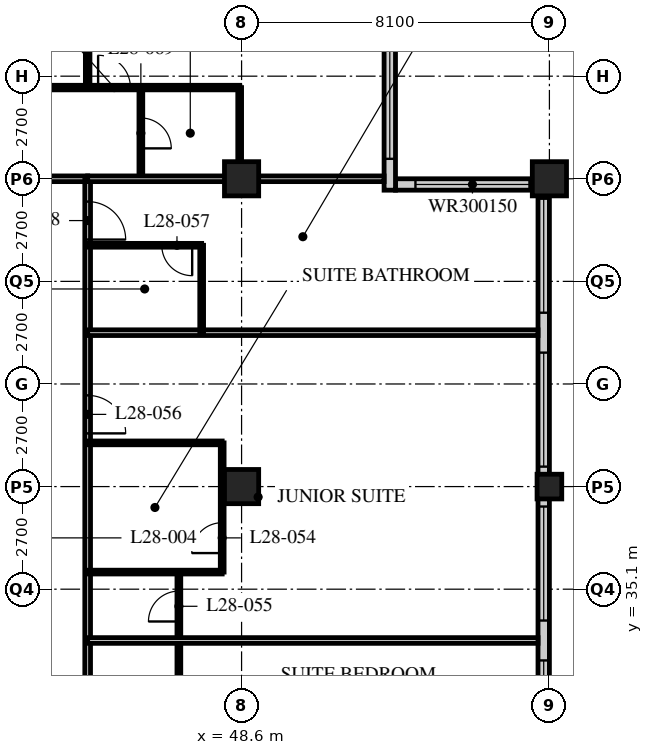
"""IFC4 building model, lengths in metres.
Left out: names, types, materials, properties, quantities, classifications, styles, units other than length and angle.
Written with IfcOpenShell. Run it as: python <this file> out.ifc"""

import sys

from ifc_helpers import new_model, si_unit, direction, frame, frame_2d, origin, origin_2d, place, context, subcontext, project, spatial, rectangle, hollow_rectangle, extrude, element, fill, save


model = new_model("IFC4")
c1 = context("Model", 3, precision=1e-05, world=origin(), true_north=direction((0.0, 1.0)))
c2 = subcontext(c1, "Body", "Model", "MODEL_VIEW")
j1 = project(units=[si_unit("LENGTHUNIT", "METRE"), si_unit("PLANEANGLEUNIT", "RADIAN")], contexts=[c1])
p1 = place(None, origin())
s1 = spatial("IfcSite", under=j1, at=p1, CompositionType="ELEMENT")
p2 = place(p1, origin())
s2 = spatial("IfcBuilding", under=s1, at=p2, CompositionType="ELEMENT")
p3 = place(p2, frame((0.0, 0.0, 113.6)))
s3 = spatial("IfcBuildingStorey", under=s2, at=p3, CompositionType="ELEMENT", Elevation=113.6)
for number, where, z_axis, x_axis in (
    (1, (48.6, 37.8, 0.0), (0.0, 0.0, 1.0), (1.0, 0.0, 0.0)),
    (2, (48.6, 45.9, 0.0), (0.0, 0.0, 1.0), (1.0, 0.0, 0.0)),
):
    element("IfcColumn", number, at=place(p3, frame(where, z_axis=z_axis, x_axis=x_axis)), inside=s3, PredefinedType="COLUMN", context=c2, shape_type="SweptSolid", body=[
        extrude(hollow_rectangle(XDim=0.9, YDim=0.9, WallThickness=0.09, at=origin_2d()), origin(), (0.0, 0.0, 1.0), 3.4),
    ])
p4 = place(p3, frame((56.7, 37.8, 0.0), z_axis=(0.0, 0.0, 1.0), x_axis=(1.0, 0.0, 0.0)))
e3 = element("IfcColumn", 3, at=p4, inside=s3, PredefinedType="COLUMN", context=c2, shape_type="SweptSolid", body=[
    extrude(hollow_rectangle(XDim=0.65, YDim=0.65, WallThickness=0.055, at=origin_2d()), origin(), (0.0, 0.0, 1.0), 3.4),
])
p5 = place(p3, frame((56.7, 45.9, 0.0), z_axis=(0.0, 0.0, 1.0), x_axis=(1.0, 0.0, 0.0)))
e4 = element("IfcColumn", 4, at=p5, inside=s3, PredefinedType="COLUMN", context=c2, shape_type="SweptSolid", body=[
    extrude(hollow_rectangle(XDim=0.9, YDim=0.9, WallThickness=0.09, at=origin_2d()), origin(), (0.0, 0.0, 1.0), 3.4),
])
p6 = place(p3, frame((56.55, 13.8, 0.0), z_axis=(0.0, 0.0, 1.0), x_axis=(0.0, 1.0, 0.0)))
e5 = element("IfcWall", 5, at=p6, inside=s3, PredefinedType="SOLIDWALL", context=c2, shape_type="SweptSolid", body=[
    extrude(rectangle(XDim=32.1, YDim=0.3, at=frame_2d((16.05, 0.0))), origin(), (0.0, 0.0, 1.0), 3.19),
])
p7 = place(p6, frame((0.225, 0.0, 0.9)))
e6 = element("IfcOpeningElement", 6, at=p7, cuts=e5, PredefinedType="OPENING", context=c2, shape_type="SweptSolid", body=[
    extrude(rectangle(XDim=3.0, YDim=2.0, at=frame_2d((1.5, 1.0))), frame((0.0, 0.16, 0.0), z_axis=(0.0, -1.0, 0.0), x_axis=(1.0, 0.0, 0.0)), (0.0, 0.0, 1.0), 0.32),
])
p8 = place(p6, frame((4.275, 0.0, 0.9)))
e7 = element("IfcOpeningElement", 7, at=p8, cuts=e5, PredefinedType="OPENING", context=c2, shape_type="SweptSolid", body=[
    extrude(rectangle(XDim=3.0, YDim=2.0, at=frame_2d((1.5, 1.0))), frame((0.0, 0.16, 0.0), z_axis=(0.0, -1.0, 0.0), x_axis=(1.0, 0.0, 0.0)), (0.0, 0.0, 1.0), 0.32),
])
p9 = place(p6, frame((8.325, 0.0, 0.9)))
e8 = element("IfcOpeningElement", 8, at=p9, cuts=e5, PredefinedType="OPENING", context=c2, shape_type="SweptSolid", body=[
    extrude(rectangle(XDim=3.0, YDim=2.0, at=frame_2d((1.5, 1.0))), frame((0.0, 0.16, 0.0), z_axis=(0.0, -1.0, 0.0), x_axis=(1.0, 0.0, 0.0)), (0.0, 0.0, 1.0), 0.32),
])
p10 = place(p6, frame((12.375, 0.0, 0.9)))
e9 = element("IfcOpeningElement", 9, at=p10, cuts=e5, PredefinedType="OPENING", context=c2, shape_type="SweptSolid", body=[
    extrude(rectangle(XDim=3.0, YDim=2.0, at=frame_2d((1.5, 1.0))), frame((0.0, 0.16, 0.0), z_axis=(0.0, -1.0, 0.0), x_axis=(1.0, 0.0, 0.0)), (0.0, 0.0, 1.0), 0.32),
])
p11 = place(p6, frame((16.425, 0.0, 0.9)))
e10 = element("IfcOpeningElement", 10, at=p11, cuts=e5, PredefinedType="OPENING", context=c2, shape_type="SweptSolid", body=[
    extrude(rectangle(XDim=3.0, YDim=2.0, at=frame_2d((1.5, 1.0))), frame((0.0, 0.16, 0.0), z_axis=(0.0, -1.0, 0.0), x_axis=(1.0, 0.0, 0.0)), (0.0, 0.0, 1.0), 0.32),
])
p12 = place(p6, frame((20.475, 0.0, 0.9)))
e11 = element("IfcOpeningElement", 11, at=p12, cuts=e5, PredefinedType="OPENING", context=c2, shape_type="SweptSolid", body=[
    extrude(rectangle(XDim=3.0, YDim=2.0, at=frame_2d((1.5, 1.0))), frame((0.0, 0.16, 0.0), z_axis=(0.0, -1.0, 0.0), x_axis=(1.0, 0.0, 0.0)), (0.0, 0.0, 1.0), 0.32),
])
p13 = place(p6, frame((24.525, 0.0, 0.9)))
e12 = element("IfcOpeningElement", 12, at=p13, cuts=e5, PredefinedType="OPENING", context=c2, shape_type="SweptSolid", body=[
    extrude(rectangle(XDim=3.0, YDim=2.0, at=frame_2d((1.5, 1.0))), frame((0.0, 0.16, 0.0), z_axis=(0.0, -1.0, 0.0), x_axis=(1.0, 0.0, 0.0)), (0.0, 0.0, 1.0), 0.32),
])
p14 = place(p6, frame((28.575, 0.0, 0.9)))
e13 = element("IfcOpeningElement", 13, at=p14, cuts=e5, PredefinedType="OPENING", context=c2, shape_type="SweptSolid", body=[
    extrude(rectangle(XDim=3.0, YDim=2.0, at=frame_2d((1.5, 1.0))), frame((0.0, 0.16, 0.0), z_axis=(0.0, -1.0, 0.0), x_axis=(1.0, 0.0, 0.0)), (0.0, 0.0, 1.0), 0.32),
])
p15 = place(p3, frame((56.4, 45.75, 0.0), z_axis=(0.0, 0.0, 1.0), x_axis=(-1.0, 0.0, 0.0)))
e14 = element("IfcWall", 14, at=p15, inside=s3, PredefinedType="SOLIDWALL", context=c2, shape_type="SweptSolid", body=[
    extrude(rectangle(XDim=3.75, YDim=0.3, at=frame_2d((1.875, 0.0))), origin(), (0.0, 0.0, 1.0), 3.19),
])
p16 = place(p15, frame((0.225, 0.0, 0.9)))
e15 = element("IfcOpeningElement", 15, at=p16, cuts=e14, PredefinedType="OPENING", context=c2, shape_type="SweptSolid", body=[
    extrude(rectangle(XDim=3.0, YDim=1.5, at=frame_2d((1.5, 0.75))), frame((0.0, 0.16, 0.0), z_axis=(0.0, -1.0, 0.0), x_axis=(1.0, 0.0, 0.0)), (0.0, 0.0, 1.0), 0.32),
])
p17 = place(p3, frame((52.5, 45.6, 0.0), z_axis=(0.0, 0.0, 1.0), x_axis=(0.0, 1.0, 0.0)))
e16 = element("IfcWall", 16, at=p17, inside=s3, PredefinedType="SOLIDWALL", context=c2, shape_type="SweptSolid", body=[
    extrude(rectangle(XDim=4.35, YDim=0.3, at=frame_2d((2.175, 0.0))), origin(), (0.0, 0.0, 1.0), 3.19),
])
p18 = place(p17, frame((0.825, 0.0, 0.9)))
e17 = element("IfcOpeningElement", 17, at=p18, cuts=e16, PredefinedType="OPENING", context=c2, shape_type="SweptSolid", body=[
    extrude(rectangle(XDim=3.0, YDim=1.5, at=frame_2d((1.5, 0.75))), frame((0.0, 0.16, 0.0), z_axis=(0.0, -1.0, 0.0), x_axis=(1.0, 0.0, 0.0)), (0.0, 0.0, 1.0), 0.32),
])
p19 = place(p3, frame((12.15, 45.9, 0.0), z_axis=(0.0, 0.0, 1.0), x_axis=(1.0, 0.0, 0.0)))
e18 = element("IfcWall", 18, at=p19, inside=s3, PredefinedType="PARTITIONING", context=c2, shape_type="SweptSolid", body=[
    extrude(rectangle(XDim=32.4, YDim=0.15, at=frame_2d((16.2, 0.0))), origin(), (0.0, 0.0, 1.0), 2.578),
])
p20 = place(p19, frame((5.95, 0.0, 0.0)))
e19 = element("IfcOpeningElement", 19, at=p20, cuts=e18, PredefinedType="OPENING", context=c2, shape_type="SweptSolid", body=[
    extrude(rectangle(XDim=1.0, YDim=2.1, at=frame_2d((0.5, 1.05))), frame((0.0, 0.085, 0.0), z_axis=(0.0, -1.0, 0.0), x_axis=(1.0, 0.0, 0.0)), (0.0, 0.0, 1.0), 0.17),
])
p21 = place(p19, frame((14.05, 0.0, 0.0)))
e20 = element("IfcOpeningElement", 20, at=p21, cuts=e18, PredefinedType="OPENING", context=c2, shape_type="SweptSolid", body=[
    extrude(rectangle(XDim=1.0, YDim=2.1, at=frame_2d((0.5, 1.05))), frame((0.0, 0.085, 0.0), z_axis=(0.0, -1.0, 0.0), x_axis=(1.0, 0.0, 0.0)), (0.0, 0.0, 1.0), 0.17),
])
p22 = place(p19, frame((25.7, 0.0, 0.0)))
e21 = element("IfcOpeningElement", 21, at=p22, cuts=e18, PredefinedType="OPENING", context=c2, shape_type="SweptSolid", body=[
    extrude(rectangle(XDim=1.0, YDim=2.1, at=frame_2d((0.5, 1.05))), frame((0.0, 0.085, 0.0), z_axis=(0.0, -1.0, 0.0), x_axis=(1.0, 0.0, 0.0)), (0.0, 0.0, 1.0), 0.17),
])
p23 = place(p19, frame((29.875, 0.0, 0.0)))
e22 = element("IfcOpeningElement", 22, at=p23, cuts=e18, PredefinedType="OPENING", context=c2, shape_type="SweptSolid", body=[
    extrude(rectangle(XDim=1.0, YDim=2.1, at=frame_2d((0.5, 1.05))), frame((0.0, 0.085, 0.0), z_axis=(0.0, -1.0, 0.0), x_axis=(1.0, 0.0, 0.0)), (0.0, 0.0, 1.0), 0.17),
])
p24 = place(p19, frame((1.525, 0.0, 0.0)))
e23 = element("IfcOpeningElement", 23, at=p24, cuts=e18, PredefinedType="OPENING", context=c2, shape_type="SweptSolid", body=[
    extrude(rectangle(XDim=1.0, YDim=2.1, at=frame_2d((0.5, 1.05))), frame((0.0, 0.085, 0.0), z_axis=(0.0, -1.0, 0.0), x_axis=(1.0, 0.0, 0.0)), (0.0, 0.0, 1.0), 0.17),
])
p25 = place(p3, frame((44.55, 17.55, 0.0), z_axis=(0.0, 0.0, 1.0), x_axis=(0.0, 1.0, 0.0)))
e24 = element("IfcWall", 24, at=p25, inside=s3, PredefinedType="PARTITIONING", context=c2, shape_type="SweptSolid", body=[
    extrude(rectangle(XDim=28.35, YDim=0.15, at=frame_2d((14.175, 0.0))), origin(), (0.0, 0.0, 1.0), 3.19),
])
p26 = place(p25, frame((2.75, 0.0, 0.0)))
e25 = element("IfcOpeningElement", 25, at=p26, cuts=e24, PredefinedType="OPENING", context=c2, shape_type="SweptSolid", body=[
    extrude(rectangle(XDim=1.0, YDim=2.1, at=frame_2d((0.5, 1.05))), frame((0.0, 0.085, 0.0), z_axis=(0.0, -1.0, 0.0), x_axis=(1.0, 0.0, 0.0)), (0.0, 0.0, 1.0), 0.17),
])
p27 = place(p25, frame((6.5, 0.0, 0.0)))
e26 = element("IfcOpeningElement", 26, at=p27, cuts=e24, PredefinedType="OPENING", context=c2, shape_type="SweptSolid", body=[
    extrude(rectangle(XDim=1.0, YDim=2.1, at=frame_2d((0.5, 1.05))), frame((0.0, 0.085, 0.0), z_axis=(0.0, -1.0, 0.0), x_axis=(1.0, 0.0, 0.0)), (0.0, 0.0, 1.0), 0.17),
])
p28 = place(p25, frame((10.0, 0.0, 0.0)))
e27 = element("IfcOpeningElement", 27, at=p28, cuts=e24, PredefinedType="OPENING", context=c2, shape_type="SweptSolid", body=[
    extrude(rectangle(XDim=1.0, YDim=2.1, at=frame_2d((0.5, 1.05))), frame((0.0, 0.085, 0.0), z_axis=(0.0, -1.0, 0.0), x_axis=(1.0, 0.0, 0.0)), (0.0, 0.0, 1.0), 0.17),
])
p29 = place(p25, frame((21.65, 0.0, 0.0)))
e28 = element("IfcOpeningElement", 28, at=p29, cuts=e24, PredefinedType="OPENING", context=c2, shape_type="SweptSolid", body=[
    extrude(rectangle(XDim=1.0, YDim=2.1, at=frame_2d((0.5, 1.05))), frame((0.0, 0.085, 0.0), z_axis=(0.0, -1.0, 0.0), x_axis=(1.0, 0.0, 0.0)), (0.0, 0.0, 1.0), 0.17),
])
p30 = place(p25, frame((26.75, 0.0, 0.0)))
e29 = element("IfcOpeningElement", 29, at=p30, cuts=e24, PredefinedType="OPENING", context=c2, shape_type="SweptSolid", body=[
    extrude(rectangle(XDim=1.0, YDim=2.1, at=frame_2d((0.5, 1.05))), frame((0.0, 0.085, 0.0), z_axis=(0.0, -1.0, 0.0), x_axis=(1.0, 0.0, 0.0)), (0.0, 0.0, 1.0), 0.17),
])
p31 = place(p3, frame((46.95, 31.15, 0.0), z_axis=(0.0, 0.0, 1.0), x_axis=(0.0, 1.0, 0.0)))
e30 = element("IfcWall", 30, at=p31, inside=s3, PredefinedType="PARTITIONING", context=c2, shape_type="SweptSolid", body=[
    extrude(rectangle(XDim=4.4, YDim=0.1, at=frame_2d((2.2, 0.0))), origin(), (0.0, 0.0, 1.0), 3.19),
])
p32 = place(p31, frame((3.1, 0.0, 0.0)))
e31 = element("IfcOpeningElement", 31, at=p32, cuts=e30, PredefinedType="OPENING", context=c2, shape_type="SweptSolid", body=[
    extrude(rectangle(XDim=0.8, YDim=2.1, at=frame_2d((0.4, 1.05))), frame((0.0, 0.06, 0.0), z_axis=(0.0, -1.0, 0.0), x_axis=(1.0, 0.0, 0.0)), (0.0, 0.0, 1.0), 0.12),
])
p33 = place(p3, frame((44.55, 33.75, 0.0), z_axis=(0.0, 0.0, 1.0), x_axis=(1.0, 0.0, 0.0)))
e32 = element("IfcWall", 32, at=p33, inside=s3, PredefinedType="PARTITIONING", context=c2, shape_type="SweptSolid", body=[
    extrude(rectangle(XDim=11.85, YDim=0.15, at=frame_2d((5.925, 0.0))), origin(), (0.0, 0.0, 1.0), 3.19),
])
p34 = place(p3, frame((48.09, 35.55, 0.0), z_axis=(0.0, 0.0, 1.0), x_axis=(0.0, 1.0, 0.0)))
e33 = element("IfcWall", 33, at=p34, inside=s3, PredefinedType="PARTITIONING", context=c2, shape_type="SweptSolid", body=[
    extrude(rectangle(XDim=3.4, YDim=0.1, at=frame_2d((1.7, 0.0))), origin(), (0.0, 0.0, 1.0), 3.19),
])
p35 = place(p34, frame((0.5, 0.0, 0.0)))
e34 = element("IfcOpeningElement", 34, at=p35, cuts=e33, PredefinedType="OPENING", context=c2, shape_type="SweptSolid", body=[
    extrude(rectangle(XDim=0.8, YDim=2.1, at=frame_2d((0.4, 1.05))), frame((0.0, 0.06, 0.0), z_axis=(0.0, -1.0, 0.0), x_axis=(1.0, 0.0, 0.0)), (0.0, 0.0, 1.0), 0.12),
])
for number, where, z_axis, x_axis in (
    (35, (44.55, 35.55, 0.0), (0.0, 0.0, 1.0), (1.0, 0.0, 0.0)),
    (36, (44.55, 38.95, 0.0), (0.0, 0.0, 1.0), (1.0, 0.0, 0.0)),
):
    element("IfcWall", number, at=place(p3, frame(where, z_axis=z_axis, x_axis=x_axis)), inside=s3, PredefinedType="PARTITIONING", context=c2, shape_type="SweptSolid", body=[
        extrude(rectangle(XDim=3.54, YDim=0.1, at=frame_2d((1.77, 0.0))), origin(), (0.0, 0.0, 1.0), 3.19),
    ])
p36 = place(p3, frame((44.55, 41.85, 0.0), z_axis=(0.0, 0.0, 1.0), x_axis=(1.0, 0.0, 0.0)))
e37 = element("IfcWall", 37, at=p36, inside=s3, PredefinedType="PARTITIONING", context=c2, shape_type="SweptSolid", body=[
    extrude(rectangle(XDim=11.85, YDim=0.15, at=frame_2d((5.925, 0.0))), origin(), (0.0, 0.0, 1.0), 3.19),
])
p37 = place(p3, frame((47.55, 41.85, 0.0), z_axis=(0.0, 0.0, 1.0), x_axis=(0.0, 1.0, 0.0)))
e38 = element("IfcWall", 38, at=p37, inside=s3, PredefinedType="PARTITIONING", context=c2, shape_type="SweptSolid", body=[
    extrude(rectangle(XDim=2.3, YDim=0.1, at=frame_2d((1.15, 0.0))), origin(), (0.0, 0.0, 1.0), 3.19),
])
p38 = place(p3, frame((44.55, 44.15, 0.0), z_axis=(0.0, 0.0, 1.0), x_axis=(1.0, 0.0, 0.0)))
e39 = element("IfcWall", 39, at=p38, inside=s3, PredefinedType="PARTITIONING", context=c2, shape_type="SweptSolid", body=[
    extrude(rectangle(XDim=3.0, YDim=0.1, at=frame_2d((1.5, 0.0))), origin(), (0.0, 0.0, 1.0), 3.19),
])
p39 = place(p38, frame((1.95, 0.0, 0.0)))
e40 = element("IfcOpeningElement", 40, at=p39, cuts=e39, PredefinedType="OPENING", context=c2, shape_type="SweptSolid", body=[
    extrude(rectangle(XDim=0.8, YDim=2.1, at=frame_2d((0.4, 1.05))), frame((0.0, 0.06, 0.0), z_axis=(0.0, -1.0, 0.0), x_axis=(1.0, 0.0, 0.0)), (0.0, 0.0, 1.0), 0.12),
])
p40 = place(p3, frame((40.5, 48.3, 0.0), z_axis=(0.0, 0.0, 1.0), x_axis=(1.0, 0.0, 0.0)))
e41 = element("IfcWall", 41, at=p40, inside=s3, PredefinedType="PARTITIONING", context=c2, shape_type="SweptSolid", body=[
    extrude(rectangle(XDim=8.05, YDim=0.12, at=frame_2d((4.025, 0.0))), origin(), (0.0, 0.0, 1.0), 3.19),
])
p41 = place(p40, frame((0.475, 0.0, 0.0)))
e42 = element("IfcOpeningElement", 42, at=p41, cuts=e41, PredefinedType="OPENING", context=c2, shape_type="SweptSolid", body=[
    extrude(rectangle(XDim=0.85, YDim=2.1, at=frame_2d((0.425, 1.05))), frame((0.0, 0.07, 0.0), z_axis=(0.0, -1.0, 0.0), x_axis=(1.0, 0.0, 0.0)), (0.0, 0.0, 1.0), 0.14),
])
p42 = place(p40, frame((4.325, 0.0, 0.0)))
e43 = element("IfcOpeningElement", 43, at=p42, cuts=e41, PredefinedType="OPENING", context=c2, shape_type="SweptSolid", body=[
    extrude(rectangle(XDim=0.85, YDim=2.1, at=frame_2d((0.425, 1.05))), frame((0.0, 0.07, 0.0), z_axis=(0.0, -1.0, 0.0), x_axis=(1.0, 0.0, 0.0)), (0.0, 0.0, 1.0), 0.14),
])
p43 = place(p3, frame((45.95, 45.9, 0.0), z_axis=(0.0, 0.0, 1.0), x_axis=(0.0, 1.0, 0.0)))
e44 = element("IfcWall", 44, at=p43, inside=s3, PredefinedType="PARTITIONING", context=c2, shape_type="SweptSolid", body=[
    extrude(rectangle(XDim=2.4, YDim=0.1, at=frame_2d((1.2, 0.0))), origin(), (0.0, 0.0, 1.0), 3.19),
])
p44 = place(p43, frame((0.8, 0.0, 0.0)))
e45 = element("IfcOpeningElement", 45, at=p44, cuts=e44, PredefinedType="OPENING", context=c2, shape_type="SweptSolid", body=[
    extrude(rectangle(XDim=0.8, YDim=2.1, at=frame_2d((0.4, 1.05))), frame((0.0, 0.06, 0.0), z_axis=(0.0, -1.0, 0.0), x_axis=(1.0, 0.0, 0.0)), (0.0, 0.0, 1.0), 0.12),
])
p45 = place(p3, frame((48.55, 45.9, 0.0), z_axis=(0.0, 0.0, 1.0), x_axis=(0.0, 1.0, 0.0)))
e46 = element("IfcWall", 46, at=p45, inside=s3, PredefinedType="PARTITIONING", context=c2, shape_type="SweptSolid", body=[
    extrude(rectangle(XDim=2.4, YDim=0.1, at=frame_2d((1.2, 0.0))), origin(), (0.0, 0.0, 1.0), 2.578),
])
p46 = place(p3, frame((44.55, 48.3, 0.0), z_axis=(0.0, 0.0, 1.0), x_axis=(0.0, 1.0, 0.0)))
e47 = element("IfcWall", 47, at=p46, inside=s3, PredefinedType="PARTITIONING", context=c2, shape_type="SweptSolid", body=[
    extrude(rectangle(XDim=5.4, YDim=0.12, at=frame_2d((2.7, 0.0))), origin(), (0.0, 0.0, 1.0), 3.19),
])
p47 = place(p3, frame((44.55, 45.9, 0.0), z_axis=(0.0, 0.0, 1.0), x_axis=(1.0, 0.0, 0.0)))
e48 = element("IfcWall", 48, at=p47, inside=s3, PredefinedType="PARTITIONING", context=c2, shape_type="SweptSolid", body=[
    extrude(rectangle(XDim=7.8, YDim=0.15, at=frame_2d((3.9, 0.0))), origin(), (0.0, 0.0, 1.0), 2.578),
])
p48 = place(p11, origin())
e49 = element("IfcWindow", 49, at=p48, inside=s3, PartitioningType="SINGLE_PANEL", PredefinedType="WINDOW", context=c2, shape_type="SweptSolid", body=[
    extrude(rectangle(XDim=3.0, YDim=2.0, at=frame_2d((1.5, 1.0))), frame((0.0, 0.03, 0.0), z_axis=(0.0, -1.0, 0.0), x_axis=(1.0, 0.0, 0.0)), (0.0, 0.0, 1.0), 0.06),
])
fill(e10, e49)
p49 = place(p12, origin())
e50 = element("IfcWindow", 50, at=p49, inside=s3, PartitioningType="SINGLE_PANEL", PredefinedType="WINDOW", context=c2, shape_type="SweptSolid", body=[
    extrude(rectangle(XDim=3.0, YDim=2.0, at=frame_2d((1.5, 1.0))), frame((0.0, 0.03, 0.0), z_axis=(0.0, -1.0, 0.0), x_axis=(1.0, 0.0, 0.0)), (0.0, 0.0, 1.0), 0.06),
])
fill(e11, e50)
p50 = place(p13, origin())
e51 = element("IfcWindow", 51, at=p50, inside=s3, PartitioningType="SINGLE_PANEL", PredefinedType="WINDOW", context=c2, shape_type="SweptSolid", body=[
    extrude(rectangle(XDim=3.0, YDim=2.0, at=frame_2d((1.5, 1.0))), frame((0.0, 0.03, 0.0), z_axis=(0.0, -1.0, 0.0), x_axis=(1.0, 0.0, 0.0)), (0.0, 0.0, 1.0), 0.06),
])
fill(e12, e51)
p51 = place(p14, origin())
e52 = element("IfcWindow", 52, at=p51, inside=s3, PartitioningType="SINGLE_PANEL", PredefinedType="WINDOW", context=c2, shape_type="SweptSolid", body=[
    extrude(rectangle(XDim=3.0, YDim=2.0, at=frame_2d((1.5, 1.0))), frame((0.0, 0.03, 0.0), z_axis=(0.0, -1.0, 0.0), x_axis=(1.0, 0.0, 0.0)), (0.0, 0.0, 1.0), 0.06),
])
fill(e13, e52)
p52 = place(p16, origin())
e53 = element("IfcWindow", 53, at=p52, inside=s3, PartitioningType="SINGLE_PANEL", PredefinedType="WINDOW", context=c2, shape_type="SweptSolid", body=[
    extrude(rectangle(XDim=3.0, YDim=1.5, at=frame_2d((1.5, 0.75))), frame((0.0, 0.03, 0.0), z_axis=(0.0, -1.0, 0.0), x_axis=(1.0, 0.0, 0.0)), (0.0, 0.0, 1.0), 0.06),
])
fill(e15, e53)
p53 = place(p18, origin())
e54 = element("IfcWindow", 54, at=p53, inside=s3, PartitioningType="SINGLE_PANEL", PredefinedType="WINDOW", context=c2, shape_type="SweptSolid", body=[
    extrude(rectangle(XDim=3.0, YDim=1.5, at=frame_2d((1.5, 0.75))), frame((0.0, 0.03, 0.0), z_axis=(0.0, -1.0, 0.0), x_axis=(1.0, 0.0, 0.0)), (0.0, 0.0, 1.0), 0.06),
])
fill(e17, e54)
p54 = place(p35, origin())
e55 = element("IfcDoor", 55, at=p54, inside=s3, OperationType="SINGLE_SWING_LEFT", PredefinedType="DOOR", context=c2, shape_type="SweptSolid", body=[
    extrude(rectangle(XDim=0.8, YDim=2.1, at=frame_2d((0.4, 1.05))), frame((0.0, 0.025, 0.0), z_axis=(0.0, -1.0, 0.0), x_axis=(1.0, 0.0, 0.0)), (0.0, 0.0, 1.0), 0.05),
])
fill(e34, e55)
p55 = place(p32, origin())
e56 = element("IfcDoor", 56, at=p55, inside=s3, OperationType="SINGLE_SWING_LEFT", PredefinedType="DOOR", context=c2, shape_type="SweptSolid", body=[
    extrude(rectangle(XDim=0.8, YDim=2.1, at=frame_2d((0.4, 1.05))), frame((0.0, 0.025, 0.0), z_axis=(0.0, -1.0, 0.0), x_axis=(1.0, 0.0, 0.0)), (0.0, 0.0, 1.0), 0.05),
])
fill(e31, e56)
p56 = place(p29, origin())
e57 = element("IfcDoor", 57, at=p56, inside=s3, OperationType="SINGLE_SWING_RIGHT", PredefinedType="DOOR", context=c2, shape_type="SweptSolid", body=[
    extrude(rectangle(XDim=1.0, YDim=2.1, at=frame_2d((0.5, 1.05))), frame((0.0, 0.025, 0.0), z_axis=(0.0, -1.0, 0.0), x_axis=(1.0, 0.0, 0.0)), (0.0, 0.0, 1.0), 0.05),
])
fill(e28, e57)
p57 = place(p39, origin())
e58 = element("IfcDoor", 58, at=p57, inside=s3, OperationType="SINGLE_SWING_LEFT", PredefinedType="DOOR", context=c2, shape_type="SweptSolid", body=[
    extrude(rectangle(XDim=0.8, YDim=2.1, at=frame_2d((0.4, 1.05))), frame((0.0, 0.025, 0.0), z_axis=(0.0, -1.0, 0.0), x_axis=(1.0, 0.0, 0.0)), (0.0, 0.0, 1.0), 0.05),
])
fill(e40, e58)
p58 = place(p30, origin())
e59 = element("IfcDoor", 59, at=p58, inside=s3, OperationType="SINGLE_SWING_RIGHT", PredefinedType="DOOR", context=c2, shape_type="SweptSolid", body=[
    extrude(rectangle(XDim=1.0, YDim=2.1, at=frame_2d((0.5, 1.05))), frame((0.0, 0.025, 0.0), z_axis=(0.0, -1.0, 0.0), x_axis=(1.0, 0.0, 0.0)), (0.0, 0.0, 1.0), 0.05),
])
fill(e29, e59)
p59 = place(p44, origin())
e60 = element("IfcDoor", 60, at=p59, inside=s3, OperationType="SINGLE_SWING_RIGHT", PredefinedType="DOOR", context=c2, shape_type="SweptSolid", body=[
    extrude(rectangle(XDim=0.8, YDim=2.1, at=frame_2d((0.4, 1.05))), frame((0.0, 0.025, 0.0), z_axis=(0.0, -1.0, 0.0), x_axis=(1.0, 0.0, 0.0)), (0.0, 0.0, 1.0), 0.05),
])
fill(e45, e60)
p60 = place(p42, origin())
e61 = element("IfcDoor", 61, at=p60, inside=s3, OperationType="SINGLE_SWING_LEFT", PredefinedType="DOOR", context=c2, shape_type="SweptSolid", body=[
    extrude(rectangle(XDim=0.85, YDim=2.1, at=frame_2d((0.425, 1.05))), frame((0.0, 0.025, 0.0), z_axis=(0.0, -1.0, 0.0), x_axis=(1.0, 0.0, 0.0)), (0.0, 0.0, 1.0), 0.05),
])
fill(e43, e61)
save(model, sys.argv[1])
